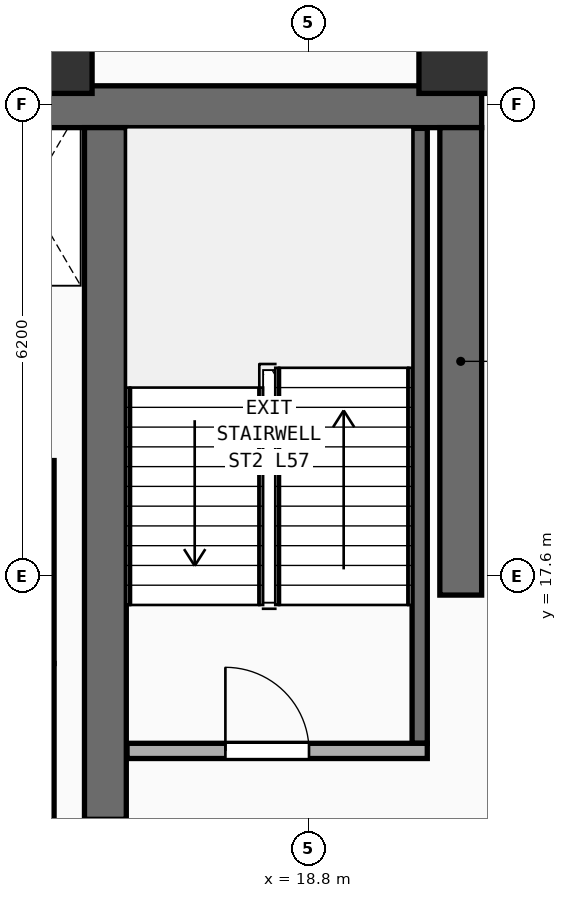
"""IFC4 building model, lengths in metres.
Left out: names, types, materials, properties, quantities, classifications, styles, units other than length and angle.
Written with IfcOpenShell. Run it as: python <this file> out.ifc"""

import sys

from ifc_helpers import new_model, si_unit, direction, frame, frame_2d, origin, origin_2d, place, context, subcontext, project, spatial, rectangle, extrude, element, fill, save


model = new_model("IFC4")
c1 = context("Model", 3, precision=1e-05, world=origin(), true_north=direction((0.0, 1.0)))
c2 = subcontext(c1, "Body", "Model", "MODEL_VIEW")
j1 = project(units=[si_unit("LENGTHUNIT", "METRE"), si_unit("PLANEANGLEUNIT", "RADIAN")], contexts=[c1])
p1 = place(None, origin())
s1 = spatial("IfcSite", under=j1, at=p1, CompositionType="ELEMENT")
p2 = place(p1, origin())
s2 = spatial("IfcBuilding", under=s1, at=p2, CompositionType="ELEMENT")
p3 = place(p2, frame((0.0, 0.0, 223.5)))
s3 = spatial("IfcBuildingStorey", under=s2, at=p3, CompositionType="ELEMENT", Elevation=223.5)
p4 = place(p3, frame((7.175, 23.775, 0.0), z_axis=(0.0, 0.0, 1.0), x_axis=(1.0, 0.0, 0.0)))
e1 = element("IfcWall", 1, at=p4, inside=s3, PredefinedType="SHEAR", context=c2, shape_type="SweptSolid", body=[
    extrude(rectangle(XDim=13.9, YDim=0.55, at=frame_2d((6.95, 0.0))), origin(), (0.0, 0.0, 1.0), 3.56),
])
p5 = place(p3, frame((20.8, 17.35, 0.0), z_axis=(0.0, 0.0, 1.0), x_axis=(0.0, 1.0, 0.0)))
e2 = element("IfcWall", 2, at=p5, inside=s3, PredefinedType="SHEAR", context=c2, shape_type="SweptSolid", body=[
    extrude(rectangle(XDim=6.15, YDim=0.55, at=frame_2d((3.075, 0.0))), origin(), (0.0, 0.0, 1.0), 3.56),
])
p6 = place(p3, frame((16.125, 14.4, 0.0), z_axis=(0.0, 0.0, 1.0), x_axis=(0.0, 1.0, 0.0)))
e3 = element("IfcWall", 3, at=p6, inside=s3, PredefinedType="SHEAR", context=c2, shape_type="SweptSolid", body=[
    extrude(rectangle(XDim=9.1, YDim=0.55, at=frame_2d((4.55, 0.0))), origin(), (0.0, 0.0, 1.0), 3.56),
])
for number, where, z_axis, x_axis in (
    (4, (15.45, 24.45, 0.0), (0.0, 0.0, 1.0), (1.0, 0.0, 0.0)),
    (5, (20.75, 24.45, 0.0), (0.0, 0.0, 1.0), (1.0, 0.0, 0.0)),
):
    element("IfcColumn", number, at=place(p3, frame(where, z_axis=z_axis, x_axis=x_axis)), inside=s3, PredefinedType="COLUMN", context=c2, shape_type="SweptSolid", body=[
        extrude(rectangle(XDim=1.0, YDim=1.0, at=origin_2d()), origin(), (0.0, 0.0, 1.0), 3.56),
    ])
p7 = place(p3, frame((27.685, 19.775, 0.0), z_axis=(0.0, 0.0, 1.0), x_axis=(-0.707106781187, 0.707106781187, 0.0)))
e6 = element("IfcWall", 6, at=p7, inside=s3, PredefinedType="SOLIDWALL", context=c2, shape_type="SweptSolid", body=[
    extrude(rectangle(XDim=9.207, YDim=0.28, at=frame_2d((4.603, 0.0))), origin(), (0.0, 0.0, 1.0), 3.56),
])
p8 = place(p3, frame((20.26, 15.4, 0.0), z_axis=(0.0, 0.0, 1.0), x_axis=(0.0, 1.0, 0.0)))
e7 = element("IfcWall", 7, at=p8, inside=s3, PredefinedType="SHEAR", context=c2, shape_type="SweptSolid", body=[
    extrude(rectangle(XDim=8.09, YDim=0.2, at=frame_2d((4.045, 0.0))), origin(), (0.0, 0.0, 1.0), 3.56),
])
p9 = place(p3, frame((16.41, 15.3, 0.0), z_axis=(0.0, 0.0, 1.0), x_axis=(1.0, 0.0, 0.0)))
e8 = element("IfcWall", 8, at=p9, inside=s3, PredefinedType="PARTITIONING", context=c2, shape_type="SweptSolid", body=[
    extrude(rectangle(XDim=3.95, YDim=0.2, at=frame_2d((1.975, 0.0))), origin(), (0.0, 0.0, 1.0), 3.56),
])
p10 = place(p9, frame((1.294, 0.0, 0.0)))
e9 = element("IfcOpeningElement", 9, at=p10, cuts=e8, PredefinedType="OPENING", context=c2, shape_type="SweptSolid", body=[
    extrude(rectangle(XDim=1.1, YDim=2.2, at=frame_2d((0.55, 1.1))), frame((0.0, 0.11, 0.0), z_axis=(0.0, -1.0, 0.0), x_axis=(1.0, 0.0, 0.0)), (0.0, 0.0, 1.0), 0.22),
])
p11 = place(p3, frame((15.35, 14.22, 0.0), z_axis=(0.0, 0.0, 1.0), x_axis=(0.0, 1.0, 0.0)))
e10 = element("IfcWall", 10, at=p11, inside=s3, PredefinedType="PARTITIONING", context=c2, shape_type="SweptSolid", body=[
    extrude(rectangle(XDim=2.23, YDim=0.2, at=frame_2d((1.115, 0.0))), origin(), (0.0, 0.0, 1.0), 3.56),
])
p12 = place(p3, frame((15.35, 16.45, 0.0), z_axis=(0.0, 0.0, 1.0), x_axis=(0.0, 1.0, 0.0)))
e11 = element("IfcWall", 11, at=p12, inside=s3, PredefinedType="PARTITIONING", context=c2, shape_type="SweptSolid", body=[
    extrude(rectangle(XDim=2.67, YDim=0.2, at=frame_2d((1.335, 0.0))), origin(), (0.0, 0.0, 1.0), 3.56),
])
p13 = place(p10, origin())
e12 = element("IfcDoor", 12, at=p13, inside=s3, OperationType="SINGLE_SWING_LEFT", PredefinedType="DOOR", context=c2, shape_type="SweptSolid", body=[
    extrude(rectangle(XDim=1.1, YDim=2.2, at=frame_2d((0.55, 1.1))), frame((0.0, 0.025, 0.0), z_axis=(0.0, -1.0, 0.0), x_axis=(1.0, 0.0, 0.0)), (0.0, 0.0, 1.0), 0.05),
])
fill(e9, e12)
save(model, sys.argv[1])
